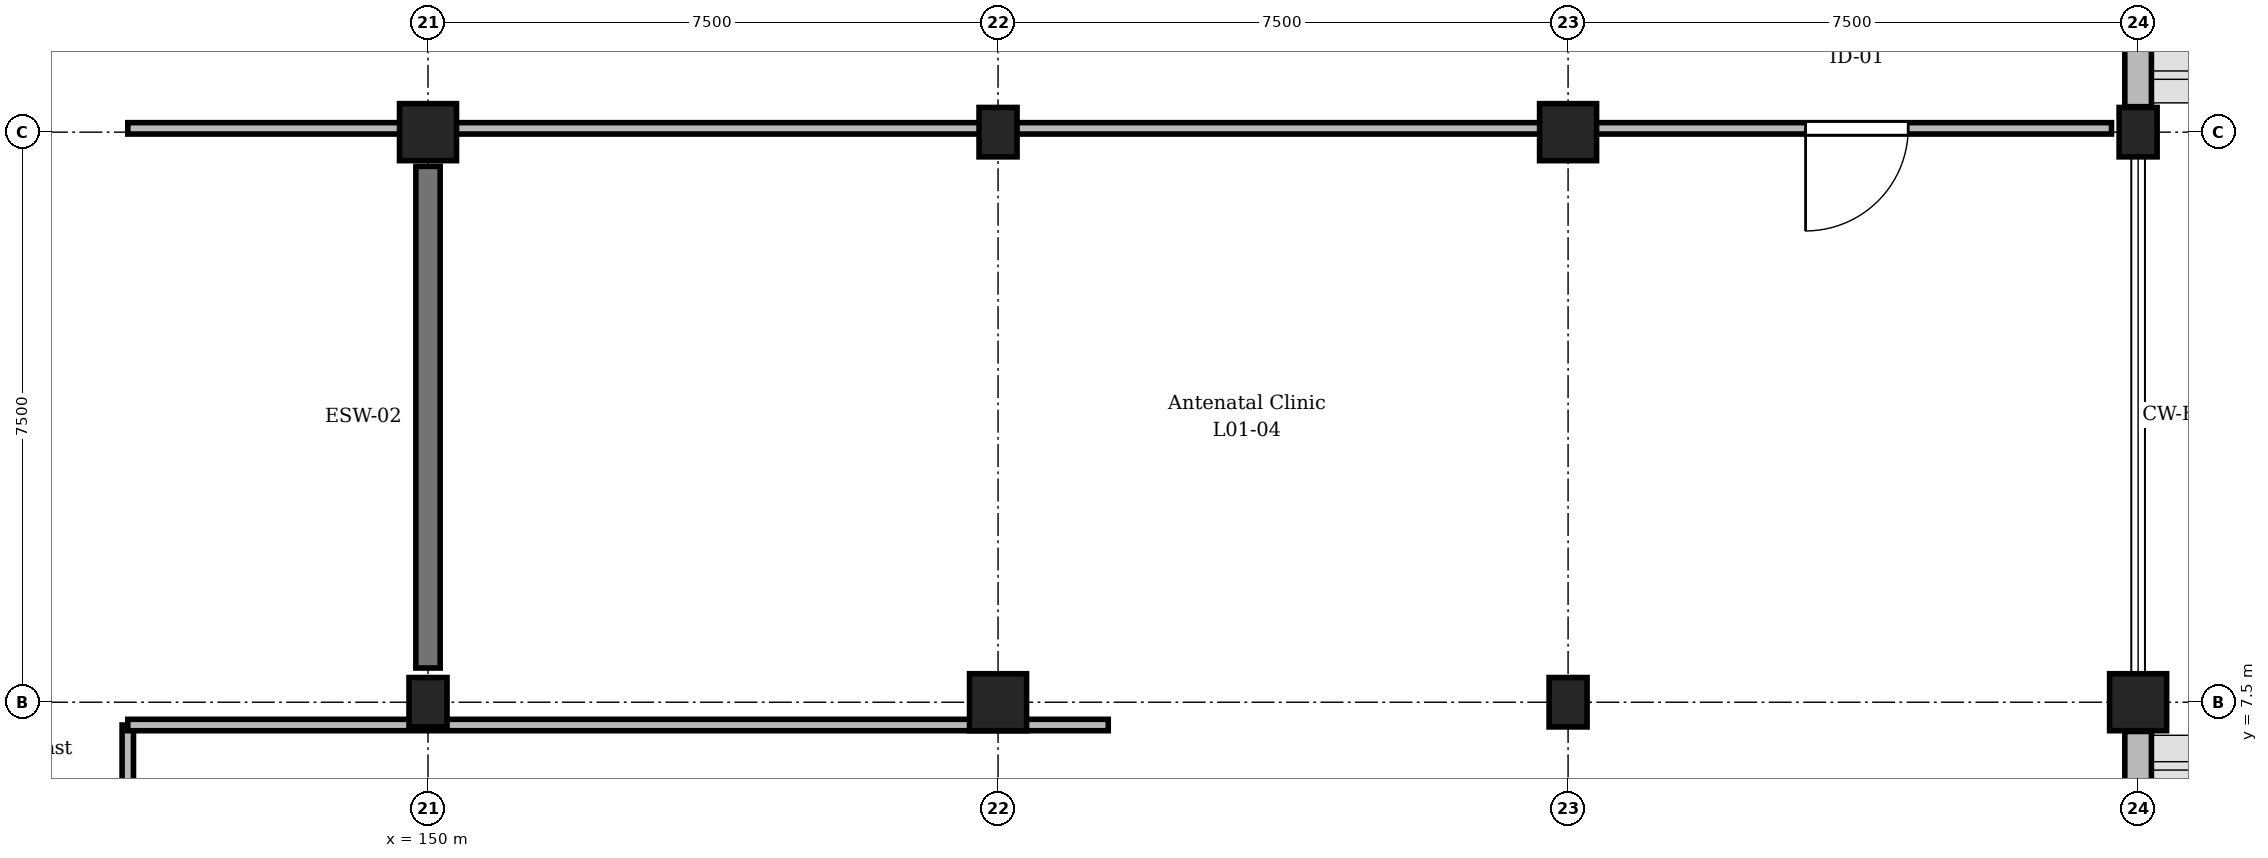
"""IFC4 building model, lengths in metres.
Left out: names, types, materials, properties, quantities, classifications, styles, units other than length and angle.
Written with IfcOpenShell. Run it as: python <this file> out.ifc"""

import sys

from ifc_helpers import new_model, si_unit, direction, frame, frame_2d, origin, origin_2d, place, context, subcontext, project, spatial, rectangle, extrude, element, fill, save


model = new_model("IFC4")
c1 = context("Model", 3, precision=1e-05, world=origin(), true_north=direction((0.0, 1.0)))
c2 = subcontext(c1, "Body", "Model", "MODEL_VIEW")
j1 = project(units=[si_unit("LENGTHUNIT", "METRE"), si_unit("PLANEANGLEUNIT", "RADIAN")], contexts=[c1])
p1 = place(None, origin())
s1 = spatial("IfcSite", under=j1, at=p1, CompositionType="ELEMENT")
p2 = place(p1, origin())
s2 = spatial("IfcBuilding", under=s1, at=p2, CompositionType="ELEMENT")
p3 = place(p2, frame((0.0, 0.0, 4.8)))
s3 = spatial("IfcBuildingStorey", under=s2, at=p3, CompositionType="ELEMENT", Elevation=4.8)
p4 = place(p3, frame((150.0, 7.5, 0.0), z_axis=(0.0, 0.0, 1.0), x_axis=(1.0, 0.0, 0.0)))
e1 = element("IfcColumn", 1, at=p4, inside=s3, PredefinedType="COLUMN", context=c2, shape_type="SweptSolid", body=[
    extrude(rectangle(XDim=0.5, YDim=0.65, at=origin_2d()), origin(), (0.0, 0.0, 1.0), 4.5),
])
for number, where, z_axis, x_axis in (
    (2, (150.0, 15.0, 0.0), (0.0, 0.0, 1.0), (1.0, 0.0, 0.0)),
    (3, (157.5, 7.5, 0.0), (0.0, 0.0, 1.0), (1.0, 0.0, 0.0)),
):
    element("IfcColumn", number, at=place(p3, frame(where, z_axis=z_axis, x_axis=x_axis)), inside=s3, PredefinedType="COLUMN", context=c2, shape_type="SweptSolid", body=[
        extrude(rectangle(XDim=0.75, YDim=0.75, at=origin_2d()), origin(), (0.0, 0.0, 1.0), 4.5),
    ])
for number, where, z_axis, x_axis in (
    (4, (157.5, 15.0, 0.0), (0.0, 0.0, 1.0), (1.0, 0.0, 0.0)),
    (5, (165.0, 7.5, 0.0), (0.0, 0.0, 1.0), (1.0, 0.0, 0.0)),
):
    element("IfcColumn", number, at=place(p3, frame(where, z_axis=z_axis, x_axis=x_axis)), inside=s3, PredefinedType="COLUMN", context=c2, shape_type="SweptSolid", body=[
        extrude(rectangle(XDim=0.5, YDim=0.65, at=origin_2d()), origin(), (0.0, 0.0, 1.0), 4.5),
    ])
for number, where, z_axis, x_axis in (
    (6, (165.0, 15.0, 0.0), (0.0, 0.0, 1.0), (1.0, 0.0, 0.0)),
    (7, (172.5, 7.5, 0.0), (0.0, 0.0, 1.0), (1.0, 0.0, 0.0)),
):
    element("IfcColumn", number, at=place(p3, frame(where, z_axis=z_axis, x_axis=x_axis)), inside=s3, PredefinedType="COLUMN", context=c2, shape_type="SweptSolid", body=[
        extrude(rectangle(XDim=0.75, YDim=0.75, at=origin_2d()), origin(), (0.0, 0.0, 1.0), 4.5),
    ])
p5 = place(p3, frame((172.5, 15.0, 0.0), z_axis=(0.0, 0.0, 1.0), x_axis=(1.0, 0.0, 0.0)))
e8 = element("IfcColumn", 8, at=p5, inside=s3, PredefinedType="COLUMN", context=c2, shape_type="SweptSolid", body=[
    extrude(rectangle(XDim=0.5, YDim=0.65, at=origin_2d()), origin(), (0.0, 0.0, 1.0), 4.5),
])
p6 = place(p3, frame((150.0, 7.95, 0.0), z_axis=(0.0, 0.0, 1.0), x_axis=(0.0, 1.0, 0.0)))
e9 = element("IfcWall", 9, at=p6, inside=s3, PredefinedType="SHEAR", context=c2, shape_type="SweptSolid", body=[
    extrude(rectangle(XDim=6.6, YDim=0.32, at=frame_2d((3.3, 0.0))), origin(), (0.0, 0.0, 1.0), 3.63),
])
p7 = place(p3, frame((172.5, 7.115, 0.0), z_axis=(0.0, 0.0, 1.0), x_axis=(0.0, -1.0, 0.0)))
e10 = element("IfcWall", 10, at=p7, inside=s3, PredefinedType="STANDARD", context=c2, shape_type="SweptSolid", body=[
    extrude(rectangle(XDim=6.855, YDim=0.35, at=frame_2d((3.427, 0.0))), origin(), (0.0, 0.0, 1.0), 3.63),
])
p8 = place(p7, frame((2.528, 0.0, 0.9)))
e11 = element("IfcOpeningElement", 11, at=p8, cuts=e10, PredefinedType="OPENING", context=c2, shape_type="SweptSolid", body=[
    extrude(rectangle(XDim=1.8, YDim=1.95, at=frame_2d((0.9, 0.975))), frame((0.0, 0.185, 0.0), z_axis=(0.0, -1.0, 0.0), x_axis=(1.0, 0.0, 0.0)), (0.0, 0.0, 1.0), 0.37),
])
p9 = place(p3, frame((172.5, 22.115, 0.0), z_axis=(0.0, 0.0, 1.0), x_axis=(0.0, -1.0, 0.0)))
e12 = element("IfcWall", 12, at=p9, inside=s3, PredefinedType="STANDARD", context=c2, shape_type="SweptSolid", body=[
    extrude(rectangle(XDim=6.78, YDim=0.35, at=frame_2d((3.39, 0.0))), origin(), (0.0, 0.0, 1.0), 3.63),
])
p10 = place(p9, frame((2.29, 0.0, 0.9)))
e13 = element("IfcOpeningElement", 13, at=p10, cuts=e12, PredefinedType="OPENING", context=c2, shape_type="SweptSolid", body=[
    extrude(rectangle(XDim=2.2, YDim=1.95, at=frame_2d((1.1, 0.975))), frame((0.0, 0.185, 0.0), z_axis=(0.0, -1.0, 0.0), x_axis=(1.0, 0.0, 0.0)), (0.0, 0.0, 1.0), 0.37),
])
p11 = place(p3, frame((146.05, 7.2, 0.0), z_axis=(0.0, 0.0, 1.0), x_axis=(0.0, -1.0, 0.0)))
e14 = element("IfcWall", 14, at=p11, inside=s3, PredefinedType="PARTITIONING", context=c2, shape_type="SweptSolid", body=[
    extrude(rectangle(XDim=6.85, YDim=0.15, at=frame_2d((3.425, 0.0))), origin(), (0.0, 0.0, 1.0), 4.165),
])
p12 = place(p11, frame((2.75, 0.0, 0.0)))
e15 = element("IfcOpeningElement", 15, at=p12, cuts=e14, PredefinedType="OPENING", context=c2, shape_type="SweptSolid", body=[
    extrude(rectangle(XDim=1.35, YDim=2.25, at=frame_2d((0.675, 1.125))), frame((0.0, 0.085, 0.0), z_axis=(0.0, -1.0, 0.0), x_axis=(1.0, 0.0, 0.0)), (0.0, 0.0, 1.0), 0.17),
])
p13 = place(p3, frame((172.15, 15.05, 0.0), z_axis=(0.0, 0.0, 1.0), x_axis=(-1.0, 0.0, 0.0)))
e16 = element("IfcWall", 16, at=p13, inside=s3, PredefinedType="PARTITIONING", context=c2, shape_type="SweptSolid", body=[
    extrude(rectangle(XDim=26.1, YDim=0.15, at=frame_2d((13.05, 0.0))), origin(), (0.0, 0.0, 1.0), 3.515),
])
p14 = place(p13, frame((2.675, 0.0, 0.0)))
e17 = element("IfcOpeningElement", 17, at=p14, cuts=e16, PredefinedType="OPENING", context=c2, shape_type="SweptSolid", body=[
    extrude(rectangle(XDim=1.35, YDim=2.25, at=frame_2d((0.675, 1.125))), frame((0.0, 0.085, 0.0), z_axis=(0.0, -1.0, 0.0), x_axis=(1.0, 0.0, 0.0)), (0.0, 0.0, 1.0), 0.17),
])
p15 = place(p3, frame((146.05, 7.2, 0.0), z_axis=(0.0, 0.0, 1.0), x_axis=(1.0, 0.0, 0.0)))
e18 = element("IfcWall", 18, at=p15, inside=s3, PredefinedType="PARTITIONING", context=c2, shape_type="SweptSolid", body=[
    extrude(rectangle(XDim=12.9, YDim=0.15, at=frame_2d((6.45, 0.0))), origin(), (0.0, 0.0, 1.0), 3.515),
])
p16 = place(p14, origin())
e19 = element("IfcDoor", 19, at=p16, inside=s3, OperationType="SINGLE_SWING_RIGHT", PredefinedType="DOOR", context=c2, shape_type="SweptSolid", body=[
    extrude(rectangle(XDim=1.35, YDim=2.25, at=frame_2d((0.675, 1.125))), frame((0.0, 0.025, 0.0), z_axis=(0.0, -1.0, 0.0), x_axis=(1.0, 0.0, 0.0)), (0.0, 0.0, 1.0), 0.05),
])
fill(e17, e19)
save(model, sys.argv[1])
